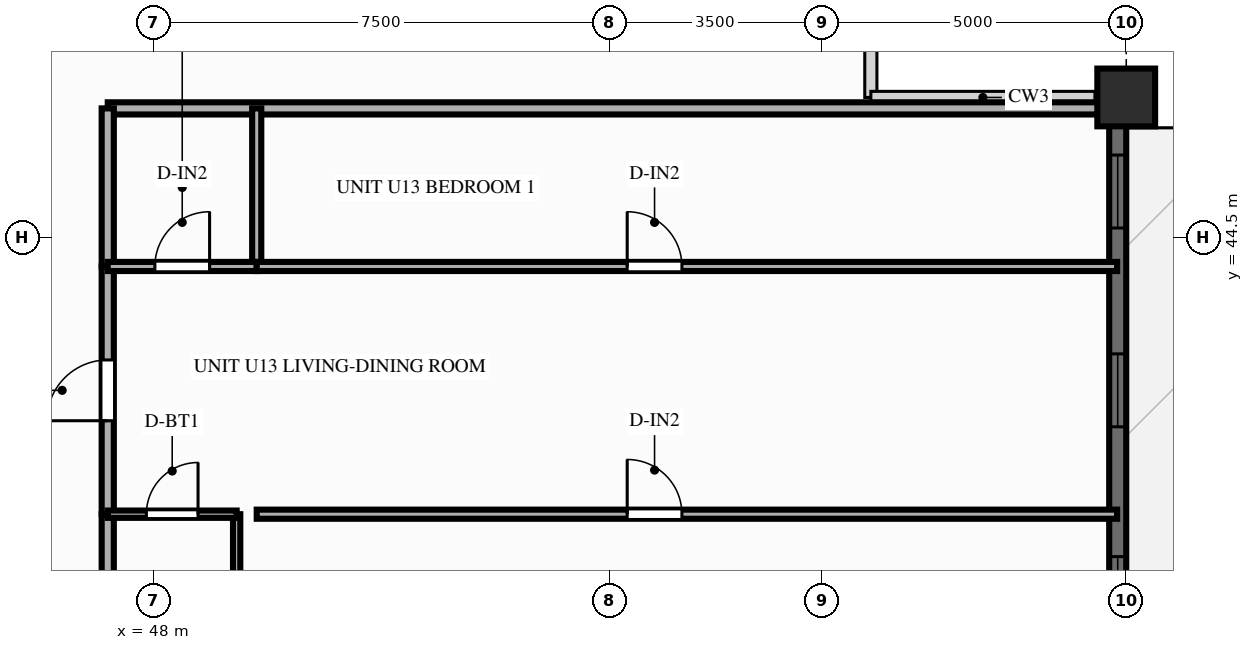
"""IFC4 building model, lengths in metres.
Left out: names, types, materials, properties, quantities, classifications, styles, units other than length and angle.
Written with IfcOpenShell. Run it as: python <this file> out.ifc"""

import sys

from ifc_helpers import new_model, si_unit, direction, frame, frame_2d, origin, origin_2d, place, context, subcontext, project, spatial, rectangle, extrude, source, transform, mapped, element, fill, save


model = new_model("IFC4")
c1 = context("Model", 3, precision=1e-05, world=origin(), true_north=direction((0.0, 1.0)))
c2 = subcontext(c1, "Body", "Model", "MODEL_VIEW")
j1 = project(units=[si_unit("LENGTHUNIT", "METRE"), si_unit("PLANEANGLEUNIT", "RADIAN")], contexts=[c1])
p1 = place(None, origin())
s1 = spatial("IfcSite", under=j1, at=p1, CompositionType="ELEMENT")
p2 = place(p1, origin())
s2 = spatial("IfcBuilding", under=s1, at=p2, CompositionType="ELEMENT")
p3 = place(p2, frame((0.0, 0.0, 107.85)))
s3 = spatial("IfcBuildingStorey", under=s2, at=p3, CompositionType="ELEMENT", Elevation=107.85)
m1 = source(origin(), c2, "Body", "SweptSolid", [
    extrude(rectangle(XDim=0.95, YDim=0.95, at=origin_2d()), origin(), (0.0, 0.0, 1.0), 3.0),
])
p4 = place(p3, frame((64.0, 46.8, 0.0), z_axis=(0.0, 0.0, 1.0), x_axis=(1.0, 0.0, 0.0)))
e1 = element("IfcColumn", 1, at=p4, inside=s3, PredefinedType="COLUMN", context=c2, shape_type="MappedRepresentation", body=[
    mapped(m1, transform((0.0, 0.0, 0.0), scale=1.0)),
])
p5 = place(p3, frame((63.86, 7.2, 0.0), z_axis=(0.0, 0.0, 1.0), x_axis=(0.0, 1.0, 0.0)))
e2 = element("IfcWall", 2, at=p5, inside=s3, PredefinedType="SOLIDWALL", context=c2, shape_type="SweptSolid", body=[
    extrude(rectangle(XDim=39.6, YDim=0.28, at=frame_2d((19.8, 0.0))), origin(), (0.0, 0.0, 1.0), 2.28),
])
p6 = place(p5, frame((0.945, 0.0, 0.25)))
e3 = element("IfcOpeningElement", 3, at=p6, cuts=e2, PredefinedType="OPENING", context=c2, shape_type="SweptSolid", body=[
    extrude(rectangle(XDim=1.2, YDim=1.5, at=frame_2d((0.6, 0.75))), frame((0.0, 0.152, 0.0), z_axis=(0.0, -1.0, 0.0), x_axis=(1.0, 0.0, 0.0)), (0.0, 0.0, 1.0), 0.304),
])
p7 = place(p5, frame((4.213, 0.0, 0.25)))
e4 = element("IfcOpeningElement", 4, at=p7, cuts=e2, PredefinedType="OPENING", context=c2, shape_type="SweptSolid", body=[
    extrude(rectangle(XDim=1.2, YDim=1.5, at=frame_2d((0.6, 0.75))), frame((0.0, 0.152, 0.0), z_axis=(0.0, -1.0, 0.0), x_axis=(1.0, 0.0, 0.0)), (0.0, 0.0, 1.0), 0.304),
])
p8 = place(p5, frame((7.55, 0.0, 0.25)))
e5 = element("IfcOpeningElement", 5, at=p8, cuts=e2, PredefinedType="OPENING", context=c2, shape_type="SweptSolid", body=[
    extrude(rectangle(XDim=1.2, YDim=1.5, at=frame_2d((0.6, 0.75))), frame((0.0, 0.152, 0.0), z_axis=(0.0, -1.0, 0.0), x_axis=(1.0, 0.0, 0.0)), (0.0, 0.0, 1.0), 0.304),
])
p9 = place(p5, frame((13.483, 0.0, 0.25)))
e6 = element("IfcOpeningElement", 6, at=p9, cuts=e2, PredefinedType="OPENING", context=c2, shape_type="SweptSolid", body=[
    extrude(rectangle(XDim=1.2, YDim=1.5, at=frame_2d((0.6, 0.75))), frame((0.0, 0.152, 0.0), z_axis=(0.0, -1.0, 0.0), x_axis=(1.0, 0.0, 0.0)), (0.0, 0.0, 1.0), 0.304),
])
p10 = place(p5, frame((16.82, 0.0, 0.25)))
e7 = element("IfcOpeningElement", 7, at=p10, cuts=e2, PredefinedType="OPENING", context=c2, shape_type="SweptSolid", body=[
    extrude(rectangle(XDim=1.2, YDim=1.5, at=frame_2d((0.6, 0.75))), frame((0.0, 0.152, 0.0), z_axis=(0.0, -1.0, 0.0), x_axis=(1.0, 0.0, 0.0)), (0.0, 0.0, 1.0), 0.304),
])
p11 = place(p5, frame((19.2, 0.0, 0.25)))
e8 = element("IfcOpeningElement", 8, at=p11, cuts=e2, PredefinedType="OPENING", context=c2, shape_type="SweptSolid", body=[
    extrude(rectangle(XDim=1.2, YDim=1.5, at=frame_2d((0.6, 0.75))), frame((0.0, 0.152, 0.0), z_axis=(0.0, -1.0, 0.0), x_axis=(1.0, 0.0, 0.0)), (0.0, 0.0, 1.0), 0.304),
])
p12 = place(p5, frame((21.578, 0.0, 0.25)))
e9 = element("IfcOpeningElement", 9, at=p12, cuts=e2, PredefinedType="OPENING", context=c2, shape_type="SweptSolid", body=[
    extrude(rectangle(XDim=1.2, YDim=1.5, at=frame_2d((0.6, 0.75))), frame((0.0, 0.152, 0.0), z_axis=(0.0, -1.0, 0.0), x_axis=(1.0, 0.0, 0.0)), (0.0, 0.0, 1.0), 0.304),
])
p13 = place(p5, frame((26.313, 0.0, 0.0), z_axis=(0.0, 0.0, 1.0), x_axis=(-1.0, 0.0, 0.0)))
e10 = element("IfcOpeningElement", 10, at=p13, cuts=e2, PredefinedType="OPENING", context=c2, shape_type="SweptSolid", body=[
    extrude(rectangle(XDim=1.6, YDim=2.15, at=frame_2d((0.8, 1.075))), frame((0.0, 0.152, 0.0), z_axis=(0.0, -1.0, 0.0), x_axis=(1.0, 0.0, 0.0)), (0.0, 0.0, 1.0), 0.304),
])
p14 = place(p5, frame((29.305, 0.0, 0.25)))
e11 = element("IfcOpeningElement", 11, at=p14, cuts=e2, PredefinedType="OPENING", context=c2, shape_type="SweptSolid", body=[
    extrude(rectangle(XDim=0.7, YDim=1.5, at=frame_2d((0.35, 0.75))), frame((0.0, 0.152, 0.0), z_axis=(0.0, -1.0, 0.0), x_axis=(1.0, 0.0, 0.0)), (0.0, 0.0, 1.0), 0.304),
])
p15 = place(p5, frame((30.848, 0.0, 0.25)))
e12 = element("IfcOpeningElement", 12, at=p15, cuts=e2, PredefinedType="OPENING", context=c2, shape_type="SweptSolid", body=[
    extrude(rectangle(XDim=1.2, YDim=1.5, at=frame_2d((0.6, 0.75))), frame((0.0, 0.152, 0.0), z_axis=(0.0, -1.0, 0.0), x_axis=(1.0, 0.0, 0.0)), (0.0, 0.0, 1.0), 0.304),
])
p16 = place(p5, frame((34.183, 0.0, 0.25)))
e13 = element("IfcOpeningElement", 13, at=p16, cuts=e2, PredefinedType="OPENING", context=c2, shape_type="SweptSolid", body=[
    extrude(rectangle(XDim=1.2, YDim=1.5, at=frame_2d((0.6, 0.75))), frame((0.0, 0.152, 0.0), z_axis=(0.0, -1.0, 0.0), x_axis=(1.0, 0.0, 0.0)), (0.0, 0.0, 1.0), 0.304),
])
p17 = place(p5, frame((37.452, 0.0, 0.25)))
e14 = element("IfcOpeningElement", 14, at=p17, cuts=e2, PredefinedType="OPENING", context=c2, shape_type="SweptSolid", body=[
    extrude(rectangle(XDim=1.2, YDim=1.5, at=frame_2d((0.6, 0.75))), frame((0.0, 0.152, 0.0), z_axis=(0.0, -1.0, 0.0), x_axis=(1.0, 0.0, 0.0)), (0.0, 0.0, 1.0), 0.304),
])
p18 = place(p3, frame((47.25, 46.62, 0.0), z_axis=(0.0, 0.0, 1.0), x_axis=(1.0, 0.0, 0.0)))
e15 = element("IfcWall", 15, at=p18, inside=s3, PredefinedType="PARTITIONING", context=c2, shape_type="SweptSolid", body=[
    extrude(rectangle(XDim=16.6, YDim=0.2, at=frame_2d((8.3, 0.0))), origin(), (0.0, 0.0, 1.0), 2.79),
])
p19 = place(p3, frame((47.25, 37.35, 0.0), z_axis=(0.0, 0.0, 1.0), x_axis=(0.0, 1.0, 0.0)))
e16 = element("IfcWall", 16, at=p19, inside=s3, PredefinedType="PARTITIONING", context=c2, shape_type="SweptSolid", body=[
    extrude(rectangle(XDim=2.595, YDim=0.2, at=frame_2d((1.298, 0.0))), origin(), (0.0, 0.0, 1.0), 2.79),
])
p20 = place(p3, frame((47.25, 39.946, 0.0), z_axis=(0.0, 0.0, 1.0), x_axis=(0.0, 1.0, 0.0)))
e17 = element("IfcWall", 17, at=p20, inside=s3, PredefinedType="PARTITIONING", context=c2, shape_type="SweptSolid", body=[
    extrude(rectangle(XDim=4.074, YDim=0.2, at=frame_2d((2.037, 0.0))), origin(), (0.0, 0.0, 1.0), 2.79),
])
p21 = place(p20, frame((1.537, 0.0, 0.0)))
e18 = element("IfcOpeningElement", 18, at=p21, cuts=e17, PredefinedType="OPENING", context=c2, shape_type="SweptSolid", body=[
    extrude(rectangle(XDim=1.0, YDim=2.15, at=frame_2d((0.5, 1.075))), frame((0.0, 0.112, 0.0), z_axis=(0.0, -1.0, 0.0), x_axis=(1.0, 0.0, 0.0)), (0.0, 0.0, 1.0), 0.224),
])
p22 = place(p3, frame((47.25, 44.02, 0.0), z_axis=(0.0, 0.0, 1.0), x_axis=(0.0, 1.0, 0.0)))
e19 = element("IfcWall", 19, at=p22, inside=s3, PredefinedType="PARTITIONING", context=c2, shape_type="SweptSolid", body=[
    extrude(rectangle(XDim=2.6, YDim=0.2, at=frame_2d((1.3, 0.0))), origin(), (0.0, 0.0, 1.0), 2.79),
])
p23 = place(p3, frame((49.37, 37.35, 0.0), z_axis=(0.0, 0.0, 1.0), x_axis=(0.0, 1.0, 0.0)))
e20 = element("IfcWall", 20, at=p23, inside=s3, PredefinedType="PARTITIONING", context=c2, shape_type="SweptSolid", body=[
    extrude(rectangle(XDim=2.595, YDim=0.12, at=frame_2d((1.298, 0.0))), origin(), (0.0, 0.0, 1.0), 2.79),
])
p24 = place(p3, frame((49.7, 44.02, 0.0), z_axis=(0.0, 0.0, 1.0), x_axis=(0.0, 1.0, 0.0)))
e21 = element("IfcWall", 21, at=p24, inside=s3, PredefinedType="PARTITIONING", context=c2, shape_type="SweptSolid", body=[
    extrude(rectangle(XDim=2.6, YDim=0.15, at=frame_2d((1.3, 0.0))), origin(), (0.0, 0.0, 1.0), 2.79),
])
p25 = place(p3, frame((47.25, 39.946, 0.0), z_axis=(0.0, 0.0, 1.0), x_axis=(1.0, 0.0, 0.0)))
e22 = element("IfcWall", 22, at=p25, inside=s3, PredefinedType="PARTITIONING", context=c2, shape_type="SweptSolid", body=[
    extrude(rectangle(XDim=2.12, YDim=0.12, at=frame_2d((1.06, 0.0))), origin(), (0.0, 0.0, 1.0), 2.79),
])
p26 = place(p25, frame((0.635, 0.0, 0.0)))
e23 = element("IfcOpeningElement", 23, at=p26, cuts=e22, PredefinedType="OPENING", context=c2, shape_type="SweptSolid", body=[
    extrude(rectangle(XDim=0.85, YDim=2.05, at=frame_2d((0.425, 1.025))), frame((0.0, 0.072, 0.0), z_axis=(0.0, -1.0, 0.0), x_axis=(1.0, 0.0, 0.0)), (0.0, 0.0, 1.0), 0.144),
])
p27 = place(p3, frame((49.7, 39.946, 0.0), z_axis=(0.0, 0.0, 1.0), x_axis=(1.0, 0.0, 0.0)))
e24 = element("IfcWall", 24, at=p27, inside=s3, PredefinedType="PARTITIONING", context=c2, shape_type="SweptSolid", body=[
    extrude(rectangle(XDim=14.15, YDim=0.15, at=frame_2d((7.075, 0.0))), origin(), (0.0, 0.0, 1.0), 2.79),
])
p28 = place(p27, frame((6.093, 0.0, 0.0)))
e25 = element("IfcOpeningElement", 25, at=p28, cuts=e24, PredefinedType="OPENING", context=c2, shape_type="SweptSolid", body=[
    extrude(rectangle(XDim=0.9, YDim=2.1, at=frame_2d((0.45, 1.05))), frame((0.0, 0.087, 0.0), z_axis=(0.0, -1.0, 0.0), x_axis=(1.0, 0.0, 0.0)), (0.0, 0.0, 1.0), 0.174),
])
p29 = place(p3, frame((47.25, 44.02, 0.0), z_axis=(0.0, 0.0, 1.0), x_axis=(1.0, 0.0, 0.0)))
e26 = element("IfcWall", 26, at=p29, inside=s3, PredefinedType="PARTITIONING", context=c2, shape_type="SweptSolid", body=[
    extrude(rectangle(XDim=2.45, YDim=0.15, at=frame_2d((1.225, 0.0))), origin(), (0.0, 0.0, 1.0), 2.79),
])
p30 = place(p29, frame((0.775, 0.0, 0.0)))
e27 = element("IfcOpeningElement", 27, at=p30, cuts=e26, PredefinedType="OPENING", context=c2, shape_type="SweptSolid", body=[
    extrude(rectangle(XDim=0.9, YDim=2.1, at=frame_2d((0.45, 1.05))), frame((0.0, 0.087, 0.0), z_axis=(0.0, -1.0, 0.0), x_axis=(1.0, 0.0, 0.0)), (0.0, 0.0, 1.0), 0.174),
])
p31 = place(p3, frame((49.7, 44.02, 0.0), z_axis=(0.0, 0.0, 1.0), x_axis=(1.0, 0.0, 0.0)))
e28 = element("IfcWall", 28, at=p31, inside=s3, PredefinedType="PARTITIONING", context=c2, shape_type="SweptSolid", body=[
    extrude(rectangle(XDim=14.15, YDim=0.15, at=frame_2d((7.075, 0.0))), origin(), (0.0, 0.0, 1.0), 2.79),
])
p32 = place(p31, frame((6.093, 0.0, 0.0)))
e29 = element("IfcOpeningElement", 29, at=p32, cuts=e28, PredefinedType="OPENING", context=c2, shape_type="SweptSolid", body=[
    extrude(rectangle(XDim=0.9, YDim=2.1, at=frame_2d((0.45, 1.05))), frame((0.0, 0.087, 0.0), z_axis=(0.0, -1.0, 0.0), x_axis=(1.0, 0.0, 0.0)), (0.0, 0.0, 1.0), 0.174),
])
m2 = source(origin(), c2, "Body", "SweptSolid", [
    extrude(rectangle(XDim=1.2, YDim=1.5, at=frame_2d((0.6, 0.75))), frame((0.0, 0.03, 0.0), z_axis=(0.0, -1.0, 0.0), x_axis=(1.0, 0.0, 0.0)), (0.0, 0.0, 1.0), 0.06),
])
p33 = place(p15, origin())
e30 = element("IfcWindow", 30, at=p33, inside=s3, PartitioningType="SINGLE_PANEL", PredefinedType="WINDOW", context=c2, shape_type="MappedRepresentation", body=[
    mapped(m2, transform((0.0, 0.0, 0.0), scale=1.0)),
])
fill(e12, e30)
p34 = place(p16, origin())
e31 = element("IfcWindow", 31, at=p34, inside=s3, PartitioningType="SINGLE_PANEL", PredefinedType="WINDOW", context=c2, shape_type="MappedRepresentation", body=[
    mapped(m2, transform((0.0, 0.0, 0.0), scale=1.0)),
])
fill(e13, e31)
p35 = place(p17, origin())
e32 = element("IfcWindow", 32, at=p35, inside=s3, PartitioningType="SINGLE_PANEL", PredefinedType="WINDOW", context=c2, shape_type="MappedRepresentation", body=[
    mapped(m2, transform((0.0, 0.0, 0.0), scale=1.0)),
])
fill(e14, e32)
m3 = source(origin(), c2, "Body", "SweptSolid", [
    extrude(rectangle(XDim=1.0, YDim=2.15, at=frame_2d((0.5, 1.075))), frame((0.0, 0.025, 0.0), z_axis=(0.0, -1.0, 0.0), x_axis=(1.0, 0.0, 0.0)), (0.0, 0.0, 1.0), 0.05),
])
p36 = place(p21, origin())
e33 = element("IfcDoor", 33, at=p36, inside=s3, OperationType="SINGLE_SWING_LEFT", PredefinedType="DOOR", context=c2, shape_type="MappedRepresentation", body=[
    mapped(m3, transform((0.0, 0.0, 0.0), scale=1.0)),
])
fill(e18, e33)
m4 = source(origin(), c2, "Body", "SweptSolid", [
    extrude(rectangle(XDim=0.85, YDim=2.05, at=frame_2d((0.425, 1.025))), frame((0.0, 0.025, 0.0), z_axis=(0.0, -1.0, 0.0), x_axis=(1.0, 0.0, 0.0)), (0.0, 0.0, 1.0), 0.05),
])
p37 = place(p26, origin())
e34 = element("IfcDoor", 34, at=p37, inside=s3, OperationType="SINGLE_SWING_RIGHT", PredefinedType="DOOR", context=c2, shape_type="MappedRepresentation", body=[
    mapped(m4, transform((0.0, 0.0, 0.0), scale=1.0)),
])
fill(e23, e34)
m5 = source(origin(), c2, "Body", "SweptSolid", [
    extrude(rectangle(XDim=0.9, YDim=2.1, at=frame_2d((0.45, 1.05))), frame((0.0, 0.025, 0.0), z_axis=(0.0, -1.0, 0.0), x_axis=(1.0, 0.0, 0.0)), (0.0, 0.0, 1.0), 0.05),
])
p38 = place(p28, origin())
e35 = element("IfcDoor", 35, at=p38, inside=s3, OperationType="SINGLE_SWING_LEFT", PredefinedType="DOOR", context=c2, shape_type="MappedRepresentation", body=[
    mapped(m5, transform((0.0, 0.0, 0.0), scale=1.0)),
])
fill(e25, e35)
p39 = place(p30, origin())
e36 = element("IfcDoor", 36, at=p39, inside=s3, OperationType="SINGLE_SWING_RIGHT", PredefinedType="DOOR", context=c2, shape_type="MappedRepresentation", body=[
    mapped(m5, transform((0.0, 0.0, 0.0), scale=1.0)),
])
fill(e27, e36)
p40 = place(p32, origin())
e37 = element("IfcDoor", 37, at=p40, inside=s3, OperationType="SINGLE_SWING_LEFT", PredefinedType="DOOR", context=c2, shape_type="MappedRepresentation", body=[
    mapped(m5, transform((0.0, 0.0, 0.0), scale=1.0)),
])
fill(e29, e37)
save(model, sys.argv[1])
